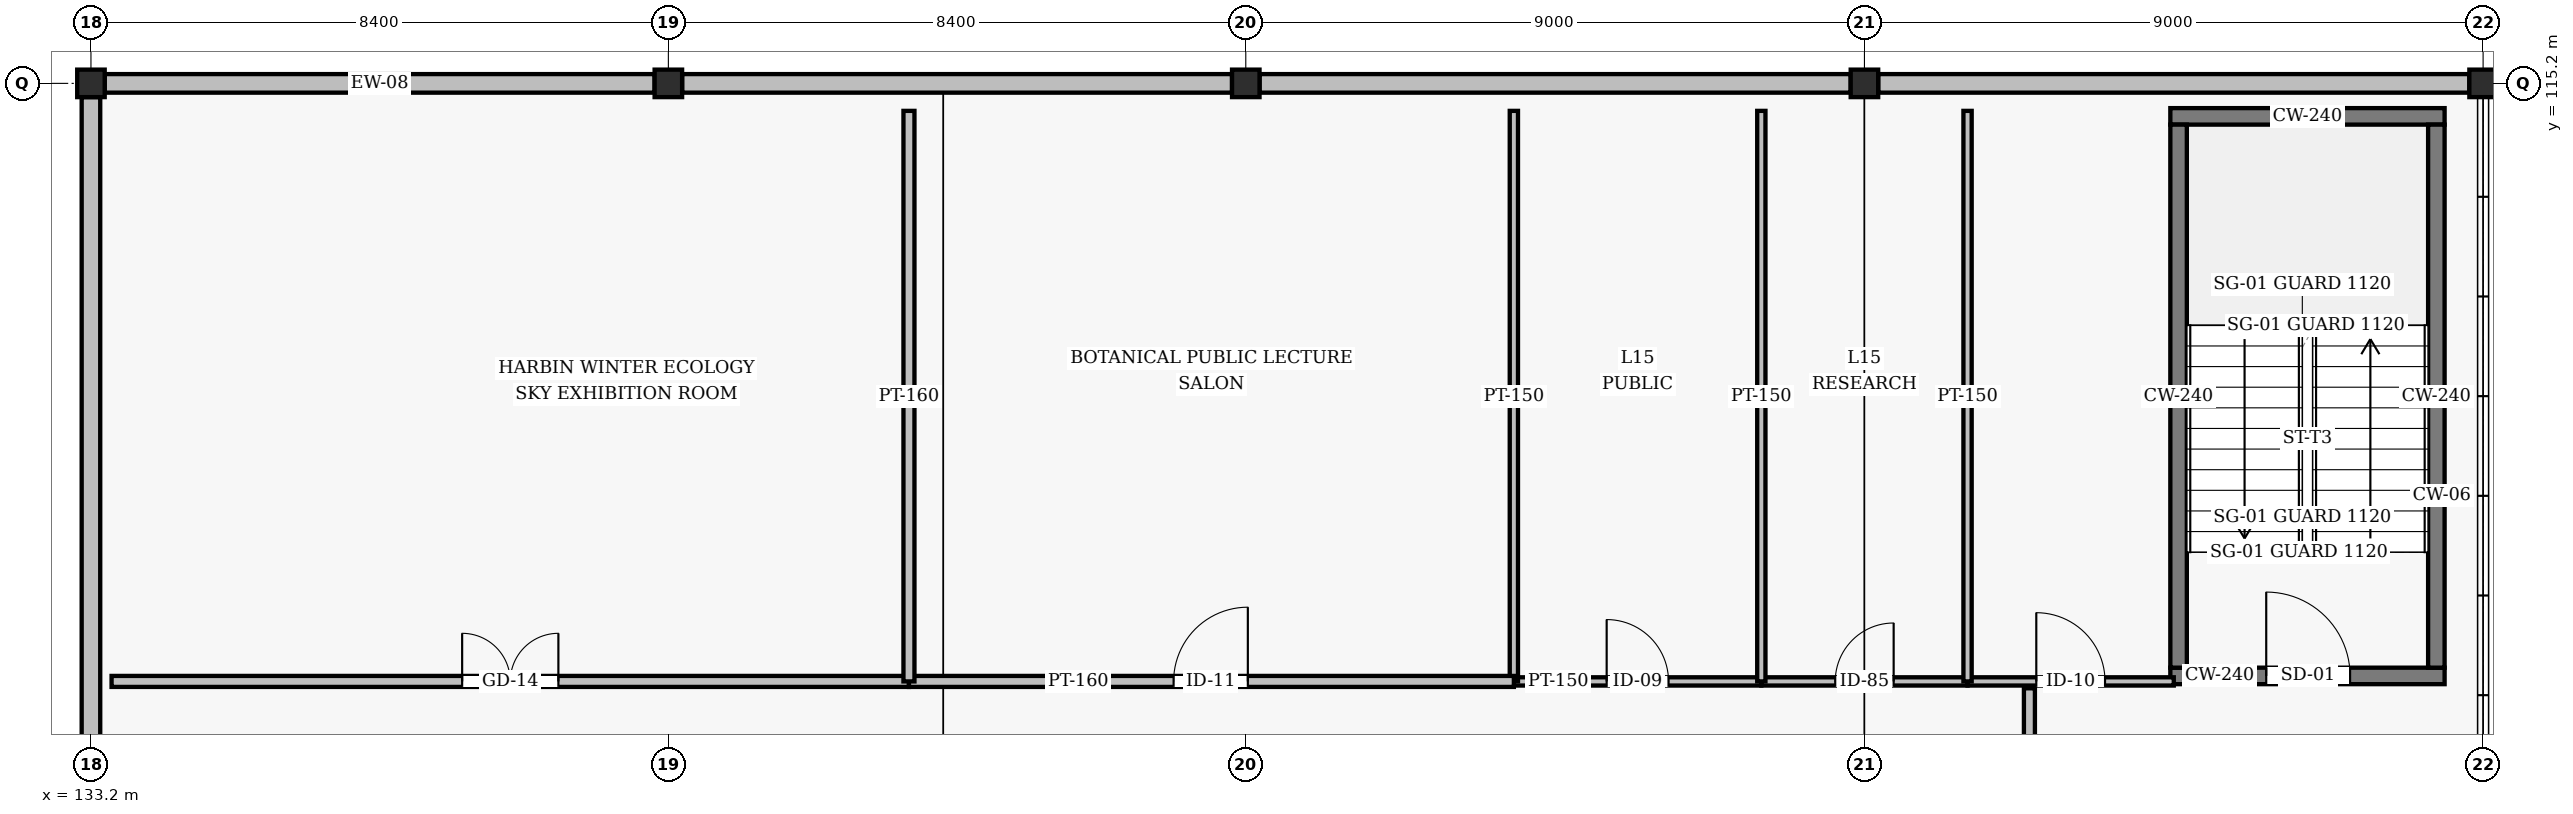
"""IFC4 building model, lengths in metres.
Left out: names, types, materials, properties, quantities, classifications, styles, units other than length and angle.
Written with IfcOpenShell. Run it as: python <this file> out.ifc"""

import sys

from ifc_helpers import new_model, si_unit, direction, frame, frame_2d, origin, origin_2d, place, context, subcontext, project, spatial, rectangle, hollow_rectangle, extrude, element, fill, save


model = new_model("IFC4")
c1 = context("Model", 3, precision=1e-05, world=origin(), true_north=direction((0.0, 1.0)))
c2 = subcontext(c1, "Body", "Model", "MODEL_VIEW")
j1 = project(units=[si_unit("LENGTHUNIT", "METRE"), si_unit("PLANEANGLEUNIT", "RADIAN")], contexts=[c1])
p1 = place(None, origin())
s1 = spatial("IfcSite", under=j1, at=p1, CompositionType="ELEMENT")
p2 = place(p1, origin())
s2 = spatial("IfcBuilding", under=s1, at=p2, CompositionType="ELEMENT")
p3 = place(p2, frame((0.0, 0.0, 57.6)))
s3 = spatial("IfcBuildingStorey", under=s2, at=p3, CompositionType="ELEMENT", Elevation=57.6)
for number, where, z_axis, x_axis in (
    (1, (133.2, 115.2, 0.0), (0.0, 0.0, 1.0), (1.0, 0.0, 0.0)),
    (2, (141.6, 115.2, 0.0), (0.0, 0.0, 1.0), (1.0, 0.0, 0.0)),
    (3, (150.0, 115.2, 0.0), (0.0, 0.0, 1.0), (1.0, 0.0, 0.0)),
    (4, (159.0, 115.2, 0.0), (0.0, 0.0, 1.0), (1.0, 0.0, 0.0)),
    (5, (168.0, 115.2, 0.0), (0.0, 0.0, 1.0), (1.0, 0.0, 0.0)),
):
    element("IfcColumn", number, at=place(p3, frame(where, z_axis=z_axis, x_axis=x_axis)), inside=s3, PredefinedType="COLUMN", context=c2, shape_type="SweptSolid", body=[
        extrude(hollow_rectangle(XDim=0.4, YDim=0.4, WallThickness=0.016, InnerFilletRadius=0.016, OuterFilletRadius=0.032, at=origin_2d()), origin(), (0.0, 0.0, 1.0), 3.6),
    ])
for number, where, z_axis, x_axis in (
    (6, (167.8, 115.2, 0.0), (0.0, 0.0, 1.0), (-1.0, 0.0, 0.0)),
    (7, (158.8, 115.2, 0.0), (0.0, 0.0, 1.0), (-1.0, 0.0, 0.0)),
):
    element("IfcWall", number, at=place(p3, frame(where, z_axis=z_axis, x_axis=x_axis)), inside=s3, PredefinedType="SOLIDWALL", context=c2, shape_type="SweptSolid", body=[
        extrude(rectangle(XDim=8.6, YDim=0.27, at=frame_2d((4.3, 0.0))), origin(), (0.0, 0.0, 1.0), 2.538),
    ])
for number, where, z_axis, x_axis in (
    (8, (149.8, 115.2, 0.0), (0.0, 0.0, 1.0), (-1.0, 0.0, 0.0)),
    (9, (141.4, 115.2, 0.0), (0.0, 0.0, 1.0), (-1.0, 0.0, 0.0)),
):
    element("IfcWall", number, at=place(p3, frame(where, z_axis=z_axis, x_axis=x_axis)), inside=s3, PredefinedType="SOLIDWALL", context=c2, shape_type="SweptSolid", body=[
        extrude(rectangle(XDim=8.0, YDim=0.27, at=frame_2d((4.0, 0.0))), origin(), (0.0, 0.0, 1.0), 2.83),
    ])
p4 = place(p3, frame((133.2, 115.0, 0.0), z_axis=(0.0, 0.0, 1.0), x_axis=(0.0, -1.0, 0.0)))
e10 = element("IfcWall", 10, at=p4, inside=s3, PredefinedType="SOLIDWALL", context=c2, shape_type="SweptSolid", body=[
    extrude(rectangle(XDim=11.6, YDim=0.27, at=frame_2d((5.8, 0.0))), origin(), (0.0, 0.0, 1.0), 2.538),
])
p5 = place(p3, frame((163.45, 106.58, 0.0), z_axis=(0.0, 0.0, 1.0), x_axis=(1.0, 0.0, 0.0)))
e11 = element("IfcWall", 11, at=p5, inside=s3, PredefinedType="SHEAR", context=c2, shape_type="SweptSolid", body=[
    extrude(rectangle(XDim=3.99, YDim=0.24, at=frame_2d((1.995, 0.0))), origin(), (0.0, 0.0, 1.0), 3.33),
])
p6 = place(p5, frame((1.395, 0.0, 0.0)))
e12 = element("IfcOpeningElement", 12, at=p6, cuts=e11, PredefinedType="OPENING", context=c2, shape_type="SweptSolid", body=[
    extrude(rectangle(XDim=1.22, YDim=2.18, at=frame_2d((0.61, 1.09))), frame((0.0, 0.13, 0.0), z_axis=(0.0, -1.0, 0.0), x_axis=(1.0, 0.0, 0.0)), (0.0, 0.0, 1.0), 0.26),
])
p7 = place(p3, frame((163.45, 114.72, 0.0), z_axis=(0.0, 0.0, 1.0), x_axis=(1.0, 0.0, 0.0)))
e13 = element("IfcWall", 13, at=p7, inside=s3, PredefinedType="SHEAR", context=c2, shape_type="SweptSolid", body=[
    extrude(rectangle(XDim=3.99, YDim=0.24, at=frame_2d((1.995, 0.0))), origin(), (0.0, 0.0, 1.0), 3.33),
])
for number, where, z_axis, x_axis in (
    (14, (163.57, 106.7, 0.0), (0.0, 0.0, 1.0), (0.0, 1.0, 0.0)),
    (15, (167.32, 106.7, 0.0), (0.0, 0.0, 1.0), (0.0, 1.0, 0.0)),
):
    element("IfcWall", number, at=place(p3, frame(where, z_axis=z_axis, x_axis=x_axis)), inside=s3, PredefinedType="SHEAR", context=c2, shape_type="SweptSolid", body=[
        extrude(rectangle(XDim=7.9, YDim=0.24, at=frame_2d((3.95, 0.0))), origin(), (0.0, 0.0, 1.0), 3.33),
    ])
p8 = place(p3, frame((153.9, 106.5, 0.0), z_axis=(0.0, 0.0, 1.0), x_axis=(1.0, 0.0, 0.0)))
e16 = element("IfcWall", 16, at=p8, inside=s3, PredefinedType="PARTITIONING", context=c2, shape_type="SweptSolid", body=[
    extrude(rectangle(XDim=3.6, YDim=0.12, at=frame_2d((1.8, 0.0))), origin(), (0.0, 0.0, 1.0), 3.33),
])
p9 = place(p8, frame((1.35, 0.0, 0.0)))
e17 = element("IfcOpeningElement", 17, at=p9, cuts=e16, PredefinedType="OPENING", context=c2, shape_type="SweptSolid", body=[
    extrude(rectangle(XDim=0.9, YDim=2.1, at=frame_2d((0.45, 1.05))), frame((0.0, 0.07, 0.0), z_axis=(0.0, -1.0, 0.0), x_axis=(1.0, 0.0, 0.0)), (0.0, 0.0, 1.0), 0.14),
])
p10 = place(p3, frame((157.5, 106.5, 0.0), z_axis=(0.0, 0.0, 1.0), x_axis=(1.0, 0.0, 0.0)))
e18 = element("IfcWall", 18, at=p10, inside=s3, PredefinedType="PARTITIONING", context=c2, shape_type="SweptSolid", body=[
    extrude(rectangle(XDim=3.0, YDim=0.12, at=frame_2d((1.5, 0.0))), origin(), (0.0, 0.0, 1.0), 2.63),
])
p11 = place(p10, frame((1.075, 0.0, 0.0)))
e19 = element("IfcOpeningElement", 19, at=p11, cuts=e18, PredefinedType="OPENING", context=c2, shape_type="SweptSolid", body=[
    extrude(rectangle(XDim=0.85, YDim=2.1, at=frame_2d((0.425, 1.05))), frame((0.0, 0.07, 0.0), z_axis=(0.0, -1.0, 0.0), x_axis=(1.0, 0.0, 0.0)), (0.0, 0.0, 1.0), 0.14),
])
p12 = place(p3, frame((160.5, 106.5, 0.0), z_axis=(0.0, 0.0, 1.0), x_axis=(1.0, 0.0, 0.0)))
e20 = element("IfcWall", 20, at=p12, inside=s3, PredefinedType="PARTITIONING", context=c2, shape_type="SweptSolid", body=[
    extrude(rectangle(XDim=3.0, YDim=0.12, at=frame_2d((1.5, 0.0))), origin(), (0.0, 0.0, 1.0), 3.33),
])
p13 = place(p12, frame((1.0, 0.0, 0.0)))
e21 = element("IfcOpeningElement", 21, at=p13, cuts=e20, PredefinedType="OPENING", context=c2, shape_type="SweptSolid", body=[
    extrude(rectangle(XDim=1.0, YDim=2.1, at=frame_2d((0.5, 1.05))), frame((0.0, 0.07, 0.0), z_axis=(0.0, -1.0, 0.0), x_axis=(1.0, 0.0, 0.0)), (0.0, 0.0, 1.0), 0.14),
])
for number, where, z_axis, x_axis in (
    (22, (153.9, 106.5, 0.0), (0.0, 0.0, 1.0), (0.0, 1.0, 0.0)),
    (23, (157.5, 106.5, 0.0), (0.0, 0.0, 1.0), (0.0, 1.0, 0.0)),
):
    element("IfcWall", number, at=place(p3, frame(where, z_axis=z_axis, x_axis=x_axis)), inside=s3, PredefinedType="PARTITIONING", context=c2, shape_type="SweptSolid", body=[
        extrude(rectangle(XDim=8.3, YDim=0.12, at=frame_2d((4.15, 0.0))), origin(), (0.0, 0.0, 1.0), 2.934),
    ])
p14 = place(p3, frame((160.5, 106.5, 0.0), z_axis=(0.0, 0.0, 1.0), x_axis=(0.0, 1.0, 0.0)))
e24 = element("IfcWall", 24, at=p14, inside=s3, PredefinedType="PARTITIONING", context=c2, shape_type="SweptSolid", body=[
    extrude(rectangle(XDim=8.3, YDim=0.12, at=frame_2d((4.15, 0.0))), origin(), (0.0, 0.0, 1.0), 3.33),
])
p15 = place(p3, frame((161.4, 92.3, 0.0), z_axis=(0.0, 0.0, 1.0), x_axis=(0.0, 1.0, 0.0)))
e25 = element("IfcWall", 25, at=p15, inside=s3, PredefinedType="PARTITIONING", context=c2, shape_type="SweptSolid", body=[
    extrude(rectangle(XDim=14.1, YDim=0.16, at=frame_2d((7.05, 0.0))), origin(), (0.0, 0.0, 1.0), 2.734),
])
p16 = place(p15, frame((6.5, 0.0, 0.0)))
e26 = element("IfcOpeningElement", 26, at=p16, cuts=e25, PredefinedType="OPENING", context=c2, shape_type="SweptSolid", body=[
    extrude(rectangle(XDim=1.08, YDim=2.08, at=frame_2d((0.54, 1.04))), frame((0.0, 0.09, 0.0), z_axis=(0.0, -1.0, 0.0), x_axis=(1.0, 0.0, 0.0)), (0.0, 0.0, 1.0), 0.18),
])
p17 = place(p3, frame((133.5, 106.5, 0.0), z_axis=(0.0, 0.0, 1.0), x_axis=(1.0, 0.0, 0.0)))
e27 = element("IfcWall", 27, at=p17, inside=s3, PredefinedType="PARTITIONING", context=c2, shape_type="SweptSolid", body=[
    extrude(rectangle(XDim=11.6, YDim=0.16, at=frame_2d((5.8, 0.0))), origin(), (0.0, 0.0, 1.0), 2.63),
])
p18 = place(p17, frame((5.1, 0.0, 0.0)))
e28 = element("IfcOpeningElement", 28, at=p18, cuts=e27, PredefinedType="OPENING", context=c2, shape_type="SweptSolid", body=[
    extrude(rectangle(XDim=1.4, YDim=2.1, at=frame_2d((0.7, 1.05))), frame((0.0, 0.09, 0.0), z_axis=(0.0, -1.0, 0.0), x_axis=(1.0, 0.0, 0.0)), (0.0, 0.0, 1.0), 0.18),
])
p19 = place(p3, frame((145.1, 106.5, 0.0), z_axis=(0.0, 0.0, 1.0), x_axis=(1.0, 0.0, 0.0)))
e29 = element("IfcWall", 29, at=p19, inside=s3, PredefinedType="PARTITIONING", context=c2, shape_type="SweptSolid", body=[
    extrude(rectangle(XDim=8.8, YDim=0.16, at=frame_2d((4.4, 0.0))), origin(), (0.0, 0.0, 1.0), 2.63),
])
p20 = place(p19, frame((3.85, 0.0, 0.0)))
e30 = element("IfcOpeningElement", 30, at=p20, cuts=e29, PredefinedType="OPENING", context=c2, shape_type="SweptSolid", body=[
    extrude(rectangle(XDim=1.08, YDim=2.08, at=frame_2d((0.54, 1.04))), frame((0.0, 0.09, 0.0), z_axis=(0.0, -1.0, 0.0), x_axis=(1.0, 0.0, 0.0)), (0.0, 0.0, 1.0), 0.18),
])
p21 = place(p3, frame((145.1, 106.5, 0.0), z_axis=(0.0, 0.0, 1.0), x_axis=(0.0, 1.0, 0.0)))
e31 = element("IfcWall", 31, at=p21, inside=s3, PredefinedType="PARTITIONING", context=c2, shape_type="SweptSolid", body=[
    extrude(rectangle(XDim=8.3, YDim=0.16, at=frame_2d((4.15, 0.0))), origin(), (0.0, 0.0, 1.0), 2.984),
])
p22 = place(p6, origin())
e32 = element("IfcDoor", 32, at=p22, inside=s3, OperationType="SINGLE_SWING_LEFT", PredefinedType="DOOR", context=c2, shape_type="SweptSolid", body=[
    extrude(rectangle(XDim=1.22, YDim=2.18, at=frame_2d((0.61, 1.09))), frame((0.0, 0.025, 0.0), z_axis=(0.0, -1.0, 0.0), x_axis=(1.0, 0.0, 0.0)), (0.0, 0.0, 1.0), 0.05),
])
fill(e12, e32)
p23 = place(p9, origin())
e33 = element("IfcDoor", 33, at=p23, inside=s3, OperationType="SINGLE_SWING_LEFT", PredefinedType="DOOR", context=c2, shape_type="SweptSolid", body=[
    extrude(rectangle(XDim=0.9, YDim=2.1, at=frame_2d((0.45, 1.05))), frame((0.0, 0.025, 0.0), z_axis=(0.0, -1.0, 0.0), x_axis=(1.0, 0.0, 0.0)), (0.0, 0.0, 1.0), 0.05),
])
fill(e17, e33)
p24 = place(p11, origin())
e34 = element("IfcDoor", 34, at=p24, inside=s3, OperationType="SINGLE_SWING_RIGHT", PredefinedType="DOOR", context=c2, shape_type="SweptSolid", body=[
    extrude(rectangle(XDim=0.85, YDim=2.1, at=frame_2d((0.425, 1.05))), frame((0.0, 0.025, 0.0), z_axis=(0.0, -1.0, 0.0), x_axis=(1.0, 0.0, 0.0)), (0.0, 0.0, 1.0), 0.05),
])
fill(e19, e34)
p25 = place(p13, origin())
e35 = element("IfcDoor", 35, at=p25, inside=s3, OperationType="SINGLE_SWING_LEFT", PredefinedType="DOOR", context=c2, shape_type="SweptSolid", body=[
    extrude(rectangle(XDim=1.0, YDim=2.1, at=frame_2d((0.5, 1.05))), frame((0.0, 0.025, 0.0), z_axis=(0.0, -1.0, 0.0), x_axis=(1.0, 0.0, 0.0)), (0.0, 0.0, 1.0), 0.05),
])
fill(e21, e35)
p26 = place(p18, origin())
e36 = element("IfcDoor", 36, at=p26, inside=s3, OperationType="DOUBLE_DOOR_SINGLE_SWING", PredefinedType="DOOR", context=c2, shape_type="SweptSolid", body=[
    extrude(rectangle(XDim=1.4, YDim=2.1, at=frame_2d((0.7, 1.05))), frame((0.0, 0.025, 0.0), z_axis=(0.0, -1.0, 0.0), x_axis=(1.0, 0.0, 0.0)), (0.0, 0.0, 1.0), 0.05),
])
fill(e28, e36)
p27 = place(p20, origin())
e37 = element("IfcDoor", 37, at=p27, inside=s3, OperationType="SINGLE_SWING_RIGHT", PredefinedType="DOOR", context=c2, shape_type="SweptSolid", body=[
    extrude(rectangle(XDim=1.08, YDim=2.08, at=frame_2d((0.54, 1.04))), frame((0.0, 0.025, 0.0), z_axis=(0.0, -1.0, 0.0), x_axis=(1.0, 0.0, 0.0)), (0.0, 0.0, 1.0), 0.05),
])
fill(e30, e37)
save(model, sys.argv[1])
